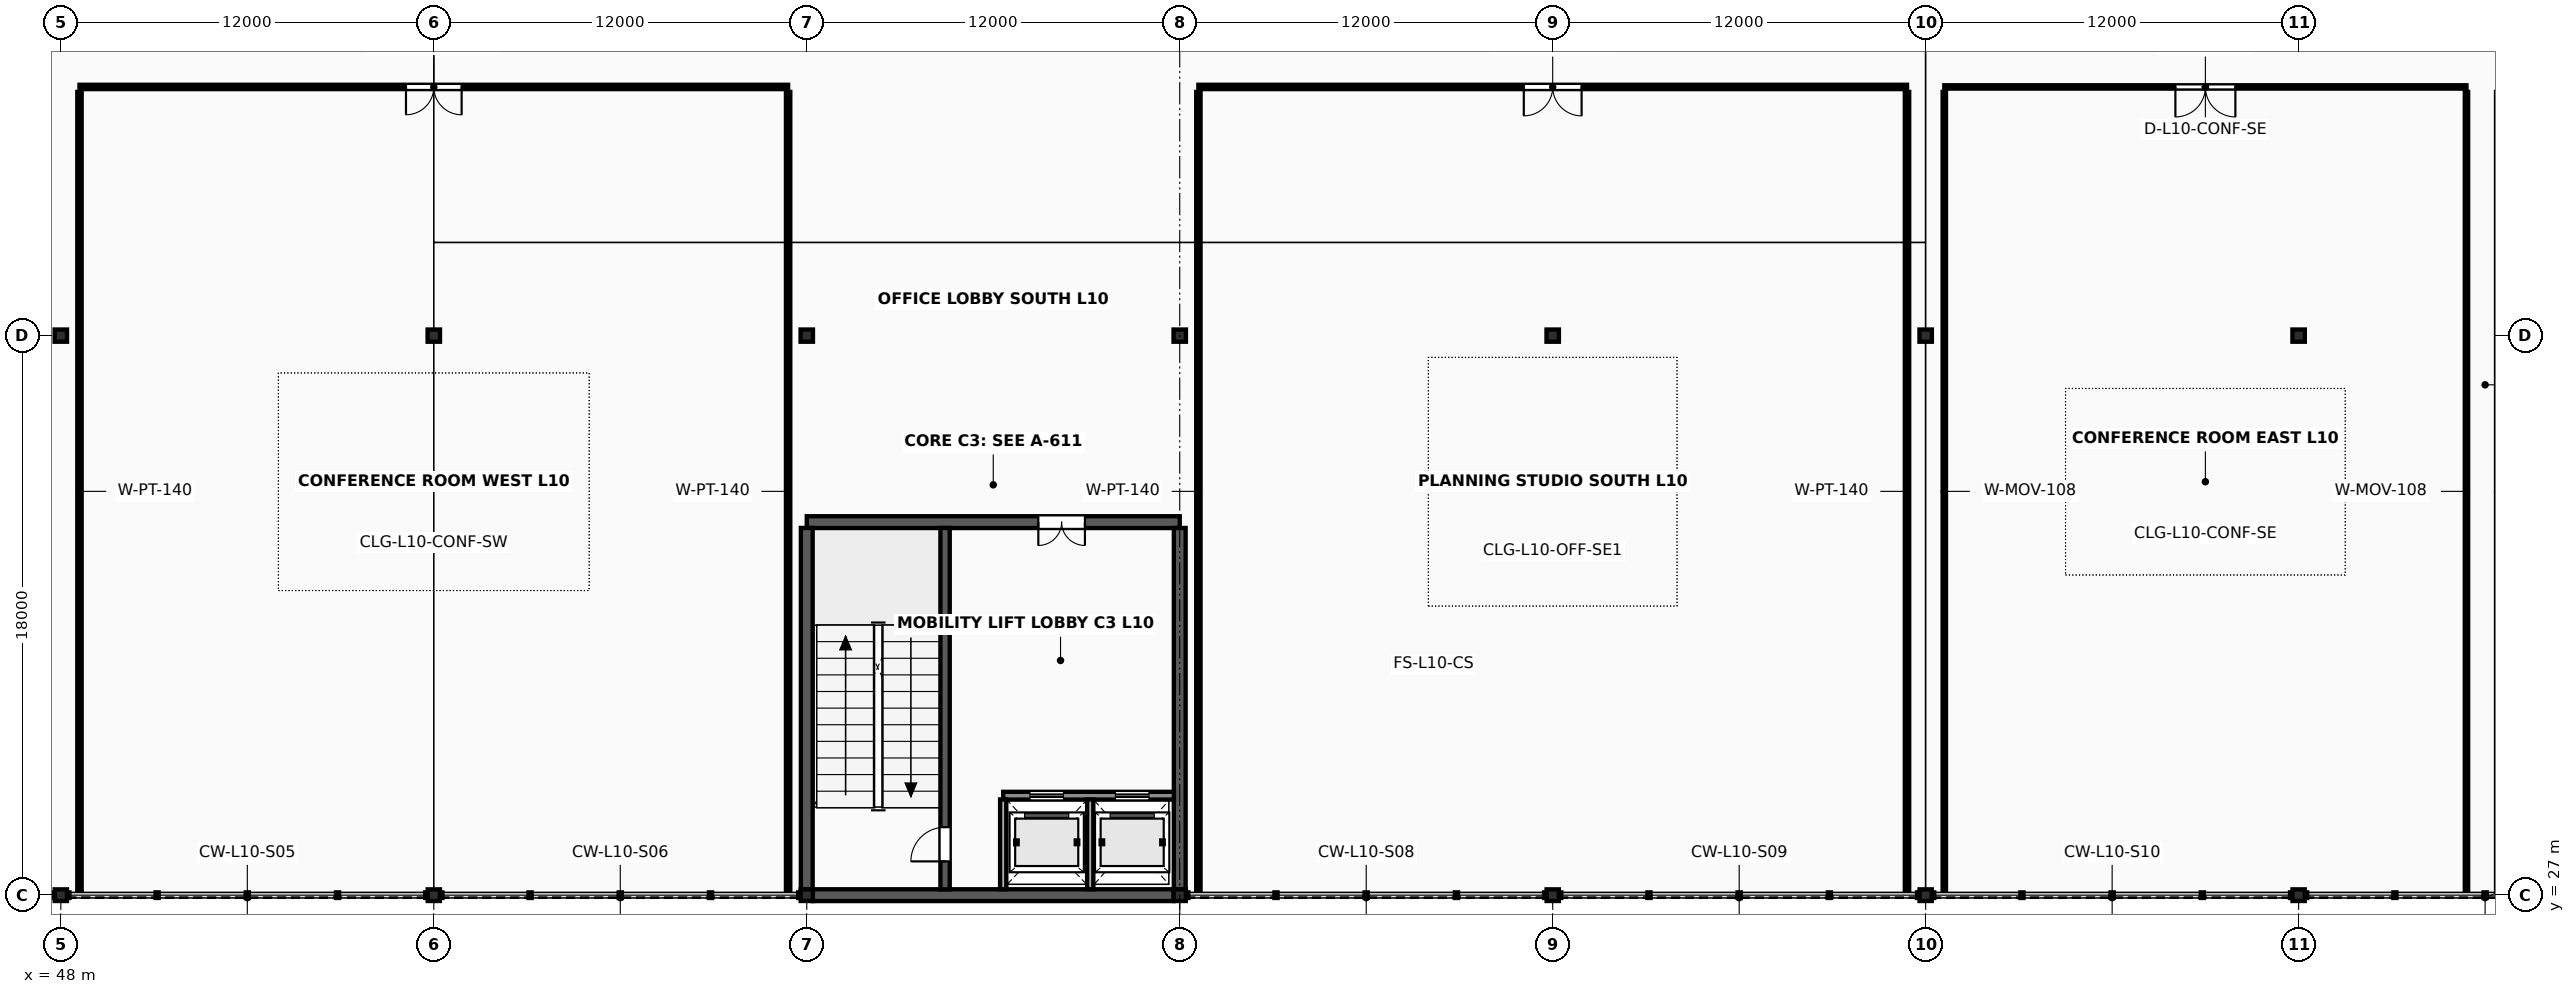
"""IFC4 building model, lengths in metres.
Left out: names, types, materials, properties, quantities, classifications, styles, units other than length and angle.
Written with IfcOpenShell. Run it as: python <this file> out.ifc"""

import sys

from ifc_helpers import new_model, si_unit, direction, frame, frame_2d, origin, origin_2d, place, context, subcontext, project, spatial, rectangle, i_section, extrude, element, fill, save


model = new_model("IFC4")
c1 = context("Model", 3, precision=1e-05, world=origin(), true_north=direction((0.0, 1.0)))
c2 = subcontext(c1, "Body", "Model", "MODEL_VIEW")
j1 = project(units=[si_unit("LENGTHUNIT", "METRE"), si_unit("PLANEANGLEUNIT", "RADIAN")], contexts=[c1])
p1 = place(None, origin())
s1 = spatial("IfcSite", under=j1, at=p1, CompositionType="ELEMENT")
p2 = place(p1, origin())
s2 = spatial("IfcBuilding", under=s1, at=p2, CompositionType="ELEMENT")
p3 = place(p2, frame((0.0, 0.0, 41.6)))
s3 = spatial("IfcBuildingStorey", under=s2, at=p3, CompositionType="ELEMENT", Elevation=41.6)
p4 = place(p3, frame((48.0, 27.0, 0.0), z_axis=(0.0, 0.0, 1.0), x_axis=(1.0, 0.0, 0.0)))
e1 = element("IfcColumn", 1, at=p4, inside=s3, PredefinedType="COLUMN", context=c2, shape_type="SweptSolid", body=[
    extrude(i_section(OverallWidth=0.394, OverallDepth=0.375, WebThickness=0.017, FlangeThickness=0.028, FilletRadius=0.018, at=origin_2d()), origin(), (0.0, 0.0, 1.0), 4.0),
])
p5 = place(p3, frame((48.0, 45.0, 0.0), z_axis=(0.0, 0.0, 1.0), x_axis=(1.0, 0.0, 0.0)))
e2 = element("IfcColumn", 2, at=p5, inside=s3, PredefinedType="COLUMN", context=c2, shape_type="SweptSolid", body=[
    extrude(i_section(OverallWidth=0.399, OverallDepth=0.393, WebThickness=0.023, FlangeThickness=0.037, FilletRadius=0.018, at=origin_2d()), origin(), (0.0, 0.0, 1.0), 4.0),
])
p6 = place(p3, frame((60.0, 27.0, 0.0), z_axis=(0.0, 0.0, 1.0), x_axis=(1.0, 0.0, 0.0)))
e3 = element("IfcColumn", 3, at=p6, inside=s3, PredefinedType="COLUMN", context=c2, shape_type="SweptSolid", body=[
    extrude(i_section(OverallWidth=0.394, OverallDepth=0.375, WebThickness=0.017, FlangeThickness=0.028, FilletRadius=0.018, at=origin_2d()), origin(), (0.0, 0.0, 1.0), 4.0),
])
p7 = place(p3, frame((60.0, 45.0, 0.0), z_axis=(0.0, 0.0, 1.0), x_axis=(1.0, 0.0, 0.0)))
e4 = element("IfcColumn", 4, at=p7, inside=s3, PredefinedType="COLUMN", context=c2, shape_type="SweptSolid", body=[
    extrude(i_section(OverallWidth=0.399, OverallDepth=0.393, WebThickness=0.023, FlangeThickness=0.037, FilletRadius=0.018, at=origin_2d()), origin(), (0.0, 0.0, 1.0), 4.0),
])
p8 = place(p3, frame((72.0, 27.0, 0.0), z_axis=(0.0, 0.0, 1.0), x_axis=(1.0, 0.0, 0.0)))
e5 = element("IfcColumn", 5, at=p8, inside=s3, PredefinedType="COLUMN", context=c2, shape_type="SweptSolid", body=[
    extrude(i_section(OverallWidth=0.394, OverallDepth=0.375, WebThickness=0.017, FlangeThickness=0.028, FilletRadius=0.018, at=origin_2d()), origin(), (0.0, 0.0, 1.0), 4.0),
])
p9 = place(p3, frame((72.0, 45.0, 0.0), z_axis=(0.0, 0.0, 1.0), x_axis=(1.0, 0.0, 0.0)))
e6 = element("IfcColumn", 6, at=p9, inside=s3, PredefinedType="COLUMN", context=c2, shape_type="SweptSolid", body=[
    extrude(i_section(OverallWidth=0.399, OverallDepth=0.393, WebThickness=0.023, FlangeThickness=0.037, FilletRadius=0.018, at=origin_2d()), origin(), (0.0, 0.0, 1.0), 4.0),
])
p10 = place(p3, frame((84.0, 27.0, 0.0), z_axis=(0.0, 0.0, 1.0), x_axis=(1.0, 0.0, 0.0)))
e7 = element("IfcColumn", 7, at=p10, inside=s3, PredefinedType="COLUMN", context=c2, shape_type="SweptSolid", body=[
    extrude(i_section(OverallWidth=0.394, OverallDepth=0.375, WebThickness=0.017, FlangeThickness=0.028, FilletRadius=0.018, at=origin_2d()), origin(), (0.0, 0.0, 1.0), 4.0),
])
p11 = place(p3, frame((84.0, 45.0, 0.0), z_axis=(0.0, 0.0, 1.0), x_axis=(1.0, 0.0, 0.0)))
e8 = element("IfcColumn", 8, at=p11, inside=s3, PredefinedType="COLUMN", context=c2, shape_type="SweptSolid", body=[
    extrude(i_section(OverallWidth=0.399, OverallDepth=0.393, WebThickness=0.023, FlangeThickness=0.037, FilletRadius=0.018, at=origin_2d()), origin(), (0.0, 0.0, 1.0), 4.0),
])
p12 = place(p3, frame((96.0, 27.0, 0.0), z_axis=(0.0, 0.0, 1.0), x_axis=(1.0, 0.0, 0.0)))
e9 = element("IfcColumn", 9, at=p12, inside=s3, PredefinedType="COLUMN", context=c2, shape_type="SweptSolid", body=[
    extrude(i_section(OverallWidth=0.394, OverallDepth=0.375, WebThickness=0.017, FlangeThickness=0.028, FilletRadius=0.018, at=origin_2d()), origin(), (0.0, 0.0, 1.0), 4.0),
])
p13 = place(p3, frame((96.0, 45.0, 0.0), z_axis=(0.0, 0.0, 1.0), x_axis=(1.0, 0.0, 0.0)))
e10 = element("IfcColumn", 10, at=p13, inside=s3, PredefinedType="COLUMN", context=c2, shape_type="SweptSolid", body=[
    extrude(i_section(OverallWidth=0.399, OverallDepth=0.393, WebThickness=0.023, FlangeThickness=0.037, FilletRadius=0.018, at=origin_2d()), origin(), (0.0, 0.0, 1.0), 4.0),
])
p14 = place(p3, frame((108.0, 27.0, 0.0), z_axis=(0.0, 0.0, 1.0), x_axis=(1.0, 0.0, 0.0)))
e11 = element("IfcColumn", 11, at=p14, inside=s3, PredefinedType="COLUMN", context=c2, shape_type="SweptSolid", body=[
    extrude(i_section(OverallWidth=0.394, OverallDepth=0.375, WebThickness=0.017, FlangeThickness=0.028, FilletRadius=0.018, at=origin_2d()), origin(), (0.0, 0.0, 1.0), 4.0),
])
p15 = place(p3, frame((108.0, 45.0, 0.0), z_axis=(0.0, 0.0, 1.0), x_axis=(1.0, 0.0, 0.0)))
e12 = element("IfcColumn", 12, at=p15, inside=s3, PredefinedType="COLUMN", context=c2, shape_type="SweptSolid", body=[
    extrude(i_section(OverallWidth=0.399, OverallDepth=0.393, WebThickness=0.023, FlangeThickness=0.037, FilletRadius=0.018, at=origin_2d()), origin(), (0.0, 0.0, 1.0), 4.0),
])
p16 = place(p3, frame((120.0, 27.0, 0.0), z_axis=(0.0, 0.0, 1.0), x_axis=(1.0, 0.0, 0.0)))
e13 = element("IfcColumn", 13, at=p16, inside=s3, PredefinedType="COLUMN", context=c2, shape_type="SweptSolid", body=[
    extrude(i_section(OverallWidth=0.394, OverallDepth=0.375, WebThickness=0.017, FlangeThickness=0.028, FilletRadius=0.018, at=origin_2d()), origin(), (0.0, 0.0, 1.0), 4.0),
])
p17 = place(p3, frame((120.0, 45.0, 0.0), z_axis=(0.0, 0.0, 1.0), x_axis=(1.0, 0.0, 0.0)))
e14 = element("IfcColumn", 14, at=p17, inside=s3, PredefinedType="COLUMN", context=c2, shape_type="SweptSolid", body=[
    extrude(i_section(OverallWidth=0.399, OverallDepth=0.393, WebThickness=0.023, FlangeThickness=0.037, FilletRadius=0.018, at=origin_2d()), origin(), (0.0, 0.0, 1.0), 4.0),
])
p18 = place(p3, frame((72.194, 27.0, 0.0), z_axis=(0.0, 0.0, 1.0), x_axis=(1.0, 0.0, 0.0)))
e15 = element("IfcWall", 15, at=p18, inside=s3, PredefinedType="SHEAR", context=c2, shape_type="SweptSolid", body=[
    extrude(rectangle(XDim=11.612, YDim=0.38, at=frame_2d((5.806, 0.0))), origin(), (0.0, 0.0, 1.0), 3.828),
])
p19 = place(p3, frame((72.0, 39.0, 0.0), z_axis=(0.0, 0.0, 1.0), x_axis=(1.0, 0.0, 0.0)))
e16 = element("IfcWall", 16, at=p19, inside=s3, PredefinedType="SHEAR", context=c2, shape_type="SweptSolid", body=[
    extrude(rectangle(XDim=12.0, YDim=0.38, at=frame_2d((6.0, 0.0))), origin(), (0.0, 0.0, 1.0), 3.828),
])
p20 = place(p19, frame((7.45, 0.0, 0.0)))
e17 = element("IfcOpeningElement", 17, at=p20, cuts=e16, PredefinedType="OPENING", context=c2, shape_type="SweptSolid", body=[
    extrude(rectangle(XDim=1.5, YDim=2.25, at=frame_2d((0.75, 1.125))), frame((0.0, 0.205, 0.0), z_axis=(0.0, -1.0, 0.0), x_axis=(1.0, 0.0, 0.0)), (0.0, 0.0, 1.0), 0.41),
])
for number, where, z_axis, x_axis in (
    (18, (72.0, 27.185, 0.0), (0.0, 0.0, 1.0), (0.0, 1.0, 0.0)),
    (19, (84.0, 27.185, 0.0), (0.0, 0.0, 1.0), (0.0, 1.0, 0.0)),
):
    element("IfcWall", number, at=place(p3, frame(where, z_axis=z_axis, x_axis=x_axis)), inside=s3, PredefinedType="SHEAR", context=c2, shape_type="SweptSolid", body=[
        extrude(rectangle(XDim=11.628, YDim=0.38, at=frame_2d((5.814, 0.0))), origin(), (0.0, 0.0, 1.0), 3.828),
    ])
p21 = place(p3, frame((76.45, 27.187, 0.0), z_axis=(0.0, 0.0, 1.0), x_axis=(0.0, 1.0, 0.0)))
e20 = element("IfcWall", 20, at=p21, inside=s3, PredefinedType="SHEAR", context=c2, shape_type="SweptSolid", body=[
    extrude(rectangle(XDim=11.626, YDim=0.3, at=frame_2d((5.813, 0.0))), origin(), (0.0, 0.0, 1.0), 3.828),
])
p22 = place(p21, frame((0.9, 0.0, 0.0)))
e21 = element("IfcOpeningElement", 21, at=p22, cuts=e20, PredefinedType="OPENING", context=c2, shape_type="SweptSolid", body=[
    extrude(rectangle(XDim=1.1, YDim=2.2, at=frame_2d((0.55, 1.1))), frame((0.0, 0.165, 0.0), z_axis=(0.0, -1.0, 0.0), x_axis=(1.0, 0.0, 0.0)), (0.0, 0.0, 1.0), 0.33),
])
p23 = place(p3, frame((78.32, 30.2, 0.0), z_axis=(0.0, 0.0, 1.0), x_axis=(1.0, 0.0, 0.0)))
e22 = element("IfcWall", 22, at=p23, inside=s3, PredefinedType="SOLIDWALL", context=c2, shape_type="SweptSolid", body=[
    extrude(rectangle(XDim=5.493, YDim=0.25, at=frame_2d((2.747, 0.0))), origin(), (0.0, 0.0, 1.0), 3.828),
])
p24 = place(p23, frame((0.86, 0.0, 0.0)))
e23 = element("IfcOpeningElement", 23, at=p24, cuts=e22, PredefinedType="OPENING", context=c2, shape_type="SweptSolid", body=[
    extrude(rectangle(XDim=1.08, YDim=2.22, at=frame_2d((0.54, 1.11))), frame((0.0, 0.14, 0.0), z_axis=(0.0, -1.0, 0.0), x_axis=(1.0, 0.0, 0.0)), (0.0, 0.0, 1.0), 0.28),
])
p25 = place(p23, frame((3.61, 0.0, 0.0)))
e24 = element("IfcOpeningElement", 24, at=p25, cuts=e22, PredefinedType="OPENING", context=c2, shape_type="SweptSolid", body=[
    extrude(rectangle(XDim=1.08, YDim=2.22, at=frame_2d((0.54, 1.11))), frame((0.0, 0.14, 0.0), z_axis=(0.0, -1.0, 0.0), x_axis=(1.0, 0.0, 0.0)), (0.0, 0.0, 1.0), 0.28),
])
for number, where, z_axis, x_axis in (
    (25, (78.32, 27.19, 0.0), (0.0, 0.0, 1.0), (0.0, 1.0, 0.0)),
    (26, (81.12, 27.19, 0.0), (0.0, 0.0, 1.0), (0.0, 1.0, 0.0)),
):
    element("IfcWall", number, at=place(p3, frame(where, z_axis=z_axis, x_axis=x_axis)), inside=s3, PredefinedType="SOLIDWALL", context=c2, shape_type="SweptSolid", body=[
        extrude(rectangle(XDim=2.89, YDim=0.2, at=frame_2d((1.445, 0.0))), origin(), (0.0, 0.0, 1.0), 3.818),
    ])
p26 = place(p3, frame((48.6, 53.0, 0.0), z_axis=(0.0, 0.0, 1.0), x_axis=(1.0, 0.0, 0.0)))
e27 = element("IfcWall", 27, at=p26, inside=s3, PredefinedType="PARTITIONING", context=c2, shape_type="SweptSolid", body=[
    extrude(rectangle(XDim=22.8, YDim=0.14, at=frame_2d((11.4, 0.0))), origin(), (0.0, 0.0, 1.0), 2.88),
])
p27 = place(p26, frame((10.505, 0.0, 0.0)))
e28 = element("IfcOpeningElement", 28, at=p27, cuts=e27, PredefinedType="OPENING", context=c2, shape_type="SweptSolid", body=[
    extrude(rectangle(XDim=1.79, YDim=2.39, at=frame_2d((0.895, 1.195))), frame((0.0, 0.085, 0.0), z_axis=(0.0, -1.0, 0.0), x_axis=(1.0, 0.0, 0.0)), (0.0, 0.0, 1.0), 0.17),
])
for number, where, z_axis, x_axis in (
    (29, (48.6, 27.14, 0.0), (0.0, 0.0, 1.0), (0.0, 1.0, 0.0)),
    (30, (71.4, 27.14, 0.0), (0.0, 0.0, 1.0), (0.0, 1.0, 0.0)),
):
    element("IfcWall", number, at=place(p3, frame(where, z_axis=z_axis, x_axis=x_axis)), inside=s3, PredefinedType="PARTITIONING", context=c2, shape_type="SweptSolid", body=[
        extrude(rectangle(XDim=25.7, YDim=0.14, at=frame_2d((12.85, 0.0))), origin(), (0.0, 0.0, 1.0), 2.88),
    ])
p28 = place(p3, frame((84.6, 53.0, 0.0), z_axis=(0.0, 0.0, 1.0), x_axis=(1.0, 0.0, 0.0)))
e31 = element("IfcWall", 31, at=p28, inside=s3, PredefinedType="PARTITIONING", context=c2, shape_type="SweptSolid", body=[
    extrude(rectangle(XDim=22.8, YDim=0.14, at=frame_2d((11.4, 0.0))), origin(), (0.0, 0.0, 1.0), 2.88),
])
p29 = place(p28, frame((10.47, 0.0, 0.0)))
e32 = element("IfcOpeningElement", 32, at=p29, cuts=e31, PredefinedType="OPENING", context=c2, shape_type="SweptSolid", body=[
    extrude(rectangle(XDim=1.86, YDim=2.41, at=frame_2d((0.93, 1.205))), frame((0.0, 0.085, 0.0), z_axis=(0.0, -1.0, 0.0), x_axis=(1.0, 0.0, 0.0)), (0.0, 0.0, 1.0), 0.17),
])
for number, where, z_axis, x_axis in (
    (33, (84.6, 27.14, 0.0), (0.0, 0.0, 1.0), (0.0, 1.0, 0.0)),
    (34, (107.4, 27.14, 0.0), (0.0, 0.0, 1.0), (0.0, 1.0, 0.0)),
):
    element("IfcWall", number, at=place(p3, frame(where, z_axis=z_axis, x_axis=x_axis)), inside=s3, PredefinedType="PARTITIONING", context=c2, shape_type="SweptSolid", body=[
        extrude(rectangle(XDim=25.7, YDim=0.14, at=frame_2d((12.85, 0.0))), origin(), (0.0, 0.0, 1.0), 2.88),
    ])
p30 = place(p3, frame((108.6, 53.0, 0.0), z_axis=(0.0, 0.0, 1.0), x_axis=(1.0, 0.0, 0.0)))
e35 = element("IfcWall", 35, at=p30, inside=s3, PredefinedType="MOVABLE", context=c2, shape_type="SweptSolid", body=[
    extrude(rectangle(XDim=16.8, YDim=0.108, at=frame_2d((8.4, 0.0))), origin(), (0.0, 0.0, 1.0), 2.88),
])
p31 = place(p30, frame((7.435, 0.0, 0.0)))
e36 = element("IfcOpeningElement", 36, at=p31, cuts=e35, PredefinedType="OPENING", context=c2, shape_type="SweptSolid", body=[
    extrude(rectangle(XDim=1.93, YDim=2.43, at=frame_2d((0.965, 1.215))), frame((0.0, 0.069, 0.0), z_axis=(0.0, -1.0, 0.0), x_axis=(1.0, 0.0, 0.0)), (0.0, 0.0, 1.0), 0.138),
])
for number, where, z_axis, x_axis in (
    (37, (108.6, 27.14, 0.0), (0.0, 0.0, 1.0), (0.0, 1.0, 0.0)),
    (38, (125.4, 27.14, 0.0), (0.0, 0.0, 1.0), (0.0, 1.0, 0.0)),
):
    element("IfcWall", number, at=place(p3, frame(where, z_axis=z_axis, x_axis=x_axis)), inside=s3, PredefinedType="MOVABLE", context=c2, shape_type="SweptSolid", body=[
        extrude(rectangle(XDim=25.7, YDim=0.108, at=frame_2d((12.85, 0.0))), origin(), (0.0, 0.0, 1.0), 2.88),
    ])
p32 = place(p22, origin())
e39 = element("IfcDoor", 39, at=p32, inside=s3, OperationType="SINGLE_SWING_LEFT", PredefinedType="DOOR", context=c2, shape_type="SweptSolid", body=[
    extrude(rectangle(XDim=1.1, YDim=2.2, at=frame_2d((0.55, 1.1))), frame((0.0, 0.025, 0.0), z_axis=(0.0, -1.0, 0.0), x_axis=(1.0, 0.0, 0.0)), (0.0, 0.0, 1.0), 0.05),
])
fill(e21, e39)
p33 = place(p20, origin())
e40 = element("IfcDoor", 40, at=p33, inside=s3, OperationType="DOUBLE_DOOR_SINGLE_SWING", PredefinedType="DOOR", context=c2, shape_type="SweptSolid", body=[
    extrude(rectangle(XDim=1.5, YDim=2.25, at=frame_2d((0.75, 1.125))), frame((0.0, 0.025, 0.0), z_axis=(0.0, -1.0, 0.0), x_axis=(1.0, 0.0, 0.0)), (0.0, 0.0, 1.0), 0.05),
])
fill(e17, e40)
p34 = place(p24, origin())
e41 = element("IfcDoor", 41, at=p34, inside=s3, OperationType="SLIDING_TO_LEFT", PredefinedType="USERDEFINED", context=c2, shape_type="SweptSolid", body=[
    extrude(rectangle(XDim=1.08, YDim=2.22, at=frame_2d((0.54, 1.11))), frame((0.0, 0.025, 0.0), z_axis=(0.0, -1.0, 0.0), x_axis=(1.0, 0.0, 0.0)), (0.0, 0.0, 1.0), 0.05),
])
fill(e23, e41)
p35 = place(p25, origin())
e42 = element("IfcDoor", 42, at=p35, inside=s3, OperationType="SLIDING_TO_LEFT", PredefinedType="USERDEFINED", context=c2, shape_type="SweptSolid", body=[
    extrude(rectangle(XDim=1.08, YDim=2.22, at=frame_2d((0.54, 1.11))), frame((0.0, 0.025, 0.0), z_axis=(0.0, -1.0, 0.0), x_axis=(1.0, 0.0, 0.0)), (0.0, 0.0, 1.0), 0.05),
])
fill(e24, e42)
p36 = place(p27, origin())
e43 = element("IfcDoor", 43, at=p36, inside=s3, OperationType="DOUBLE_DOOR_SINGLE_SWING", PredefinedType="DOOR", context=c2, shape_type="SweptSolid", body=[
    extrude(rectangle(XDim=1.79, YDim=2.39, at=frame_2d((0.895, 1.195))), frame((0.0, 0.025, 0.0), z_axis=(0.0, -1.0, 0.0), x_axis=(1.0, 0.0, 0.0)), (0.0, 0.0, 1.0), 0.05),
])
fill(e28, e43)
p37 = place(p29, origin())
e44 = element("IfcDoor", 44, at=p37, inside=s3, OperationType="DOUBLE_DOOR_SINGLE_SWING", PredefinedType="DOOR", context=c2, shape_type="SweptSolid", body=[
    extrude(rectangle(XDim=1.86, YDim=2.41, at=frame_2d((0.93, 1.205))), frame((0.0, 0.025, 0.0), z_axis=(0.0, -1.0, 0.0), x_axis=(1.0, 0.0, 0.0)), (0.0, 0.0, 1.0), 0.05),
])
fill(e32, e44)
p38 = place(p31, origin())
e45 = element("IfcDoor", 45, at=p38, inside=s3, OperationType="DOUBLE_DOOR_SINGLE_SWING", PredefinedType="DOOR", context=c2, shape_type="SweptSolid", body=[
    extrude(rectangle(XDim=1.93, YDim=2.43, at=frame_2d((0.965, 1.215))), frame((0.0, 0.025, 0.0), z_axis=(0.0, -1.0, 0.0), x_axis=(1.0, 0.0, 0.0)), (0.0, 0.0, 1.0), 0.05),
])
fill(e36, e45)
save(model, sys.argv[1])
